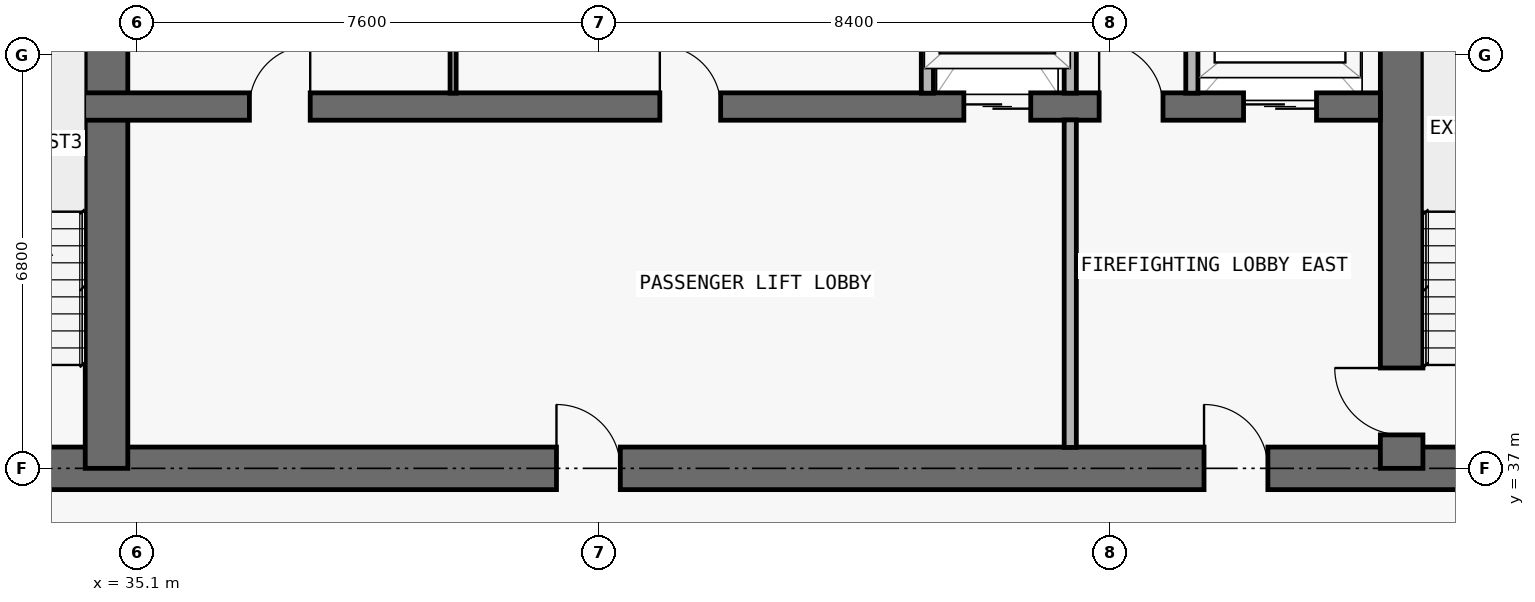
"""IFC4 building model, lengths in metres.
Left out: names, types, materials, properties, quantities, classifications, styles, units other than length and angle.
Written with IfcOpenShell. Run it as: python <this file> out.ifc"""

import sys

from ifc_helpers import new_model, si_unit, direction, frame, frame_2d, origin, place, context, subcontext, project, spatial, rectangle, extrude, element, fill, save


model = new_model("IFC4")
c1 = context("Model", 3, precision=1e-05, world=origin(), true_north=direction((0.0, 1.0)))
c2 = subcontext(c1, "Body", "Model", "MODEL_VIEW")
j1 = project(units=[si_unit("LENGTHUNIT", "METRE"), si_unit("PLANEANGLEUNIT", "RADIAN")], contexts=[c1])
p1 = place(None, origin())
s1 = spatial("IfcSite", under=j1, at=p1, CompositionType="ELEMENT")
p2 = place(p1, origin())
s2 = spatial("IfcBuilding", under=s1, at=p2, CompositionType="ELEMENT")
p3 = place(p2, frame((0.0, 0.0, 262.8)))
s3 = spatial("IfcBuildingStorey", under=s2, at=p3, CompositionType="ELEMENT", Elevation=262.8)
p4 = place(p3, frame((17.95, 37.0, 0.0), z_axis=(0.0, 0.0, 1.0), x_axis=(1.0, 0.0, 0.0)))
e1 = element("IfcWall", 1, at=p4, inside=s3, PredefinedType="SHEAR", context=c2, shape_type="SweptSolid", body=[
    extrude(rectangle(XDim=41.9, YDim=0.7, at=frame_2d((20.95, 0.0))), origin(), (0.0, 0.0, 1.0), 3.05),
])
p5 = place(p4, frame((14.35, 0.0, 0.0)))
e2 = element("IfcOpeningElement", 2, at=p5, cuts=e1, PredefinedType="OPENING", context=c2, shape_type="SweptSolid", body=[
    extrude(rectangle(XDim=1.1, YDim=2.15, at=frame_2d((0.55, 1.075))), frame((0.0, 0.36, 0.0), z_axis=(0.0, -1.0, 0.0), x_axis=(1.0, 0.0, 0.0)), (0.0, 0.0, 1.0), 0.72),
])
p6 = place(p4, frame((6.2, 0.0, 0.0)))
e3 = element("IfcOpeningElement", 3, at=p6, cuts=e1, PredefinedType="OPENING", context=c2, shape_type="SweptSolid", body=[
    extrude(rectangle(XDim=1.05, YDim=2.15, at=frame_2d((0.525, 1.075))), frame((0.0, 0.36, 0.0), z_axis=(0.0, -1.0, 0.0), x_axis=(1.0, 0.0, 0.0)), (0.0, 0.0, 1.0), 0.72),
])
p7 = place(p4, frame((34.7, 0.0, 0.0)))
e4 = element("IfcOpeningElement", 4, at=p7, cuts=e1, PredefinedType="OPENING", context=c2, shape_type="SweptSolid", body=[
    extrude(rectangle(XDim=1.05, YDim=2.15, at=frame_2d((0.525, 1.075))), frame((0.0, 0.36, 0.0), z_axis=(0.0, -1.0, 0.0), x_axis=(1.0, 0.0, 0.0)), (0.0, 0.0, 1.0), 0.72),
])
p8 = place(p4, frame((10.812, 0.0, 0.0)))
e5 = element("IfcOpeningElement", 5, at=p8, cuts=e1, PredefinedType="OPENING", context=c2, shape_type="SweptSolid", body=[
    extrude(rectangle(XDim=1.05, YDim=2.15, at=frame_2d((0.525, 1.075))), frame((0.0, 0.36, 0.0), z_axis=(0.0, -1.0, 0.0), x_axis=(1.0, 0.0, 0.0)), (0.0, 0.0, 1.0), 0.72),
])
p9 = place(p4, frame((24.05, 0.0, 0.0)))
e6 = element("IfcOpeningElement", 6, at=p9, cuts=e1, PredefinedType="OPENING", context=c2, shape_type="SweptSolid", body=[
    extrude(rectangle(XDim=1.05, YDim=2.15, at=frame_2d((0.525, 1.075))), frame((0.0, 0.36, 0.0), z_axis=(0.0, -1.0, 0.0), x_axis=(1.0, 0.0, 0.0)), (0.0, 0.0, 1.0), 0.72),
])
p10 = place(p3, frame((55.9, 37.0, 0.0), z_axis=(0.0, 0.0, 1.0), x_axis=(0.0, 1.0, 0.0)))
e7 = element("IfcWall", 7, at=p10, inside=s3, PredefinedType="SHEAR", context=c2, shape_type="SweptSolid", body=[
    extrude(rectangle(XDim=9.575, YDim=0.7, at=frame_2d((4.788, 0.0))), origin(), (0.0, 0.0, 1.0), 3.05),
])
p11 = place(p10, frame((0.55, 0.0, 0.0)))
e8 = element("IfcOpeningElement", 8, at=p11, cuts=e7, PredefinedType="OPENING", context=c2, shape_type="SweptSolid", body=[
    extrude(rectangle(XDim=1.1, YDim=2.15, at=frame_2d((0.55, 1.075))), frame((0.0, 0.36, 0.0), z_axis=(0.0, -1.0, 0.0), x_axis=(1.0, 0.0, 0.0)), (0.0, 0.0, 1.0), 0.72),
])
p12 = place(p3, frame((34.6, 37.0, 0.0), z_axis=(0.0, 0.0, 1.0), x_axis=(0.0, 1.0, 0.0)))
e9 = element("IfcWall", 9, at=p12, inside=s3, PredefinedType="SHEAR", context=c2, shape_type="SweptSolid", body=[
    extrude(rectangle(XDim=9.575, YDim=0.7, at=frame_2d((4.788, 0.0))), origin(), (0.0, 0.0, 1.0), 3.05),
])
p13 = place(p3, frame((22.25, 42.95, 0.0), z_axis=(0.0, 0.0, 1.0), x_axis=(1.0, 0.0, 0.0)))
e10 = element("IfcWall", 10, at=p13, inside=s3, PredefinedType="SHEAR", context=c2, shape_type="SweptSolid", body=[
    extrude(rectangle(XDim=33.3, YDim=0.45, at=frame_2d((16.65, 0.0))), origin(), (0.0, 0.0, 1.0), 3.05),
])
p14 = place(p13, frame((1.05, 0.0, 0.0)))
e11 = element("IfcOpeningElement", 11, at=p14, cuts=e10, PredefinedType="OPENING", context=c2, shape_type="SweptSolid", body=[
    extrude(rectangle(XDim=1.2, YDim=2.2, at=frame_2d((0.6, 1.1))), frame((0.0, 0.235, 0.0), z_axis=(0.0, -1.0, 0.0), x_axis=(1.0, 0.0, 0.0)), (0.0, 0.0, 1.0), 0.47),
])
p15 = place(p13, frame((31.05, 0.0, 0.0)))
e12 = element("IfcOpeningElement", 12, at=p15, cuts=e10, PredefinedType="OPENING", context=c2, shape_type="SweptSolid", body=[
    extrude(rectangle(XDim=1.2, YDim=2.2, at=frame_2d((0.6, 1.1))), frame((0.0, 0.235, 0.0), z_axis=(0.0, -1.0, 0.0), x_axis=(1.0, 0.0, 0.0)), (0.0, 0.0, 1.0), 0.47),
])
p16 = place(p13, frame((26.45, 0.0, 0.0)))
e13 = element("IfcOpeningElement", 13, at=p16, cuts=e10, PredefinedType="OPENING", context=c2, shape_type="SweptSolid", body=[
    extrude(rectangle(XDim=1.1, YDim=2.2, at=frame_2d((0.55, 1.1))), frame((0.0, 0.235, 0.0), z_axis=(0.0, -1.0, 0.0), x_axis=(1.0, 0.0, 0.0)), (0.0, 0.0, 1.0), 0.47),
])
p17 = place(p13, frame((5.95, 0.0, 0.0)))
e14 = element("IfcOpeningElement", 14, at=p17, cuts=e10, PredefinedType="OPENING", context=c2, shape_type="SweptSolid", body=[
    extrude(rectangle(XDim=1.1, YDim=2.2, at=frame_2d((0.55, 1.1))), frame((0.0, 0.235, 0.0), z_axis=(0.0, -1.0, 0.0), x_axis=(1.0, 0.0, 0.0)), (0.0, 0.0, 1.0), 0.47),
])
p18 = place(p13, frame((3.625, 0.0, 0.0)))
e15 = element("IfcOpeningElement", 15, at=p18, cuts=e10, PredefinedType="OPENING", context=c2, shape_type="SweptSolid", body=[
    extrude(rectangle(XDim=1.05, YDim=2.15, at=frame_2d((0.525, 1.075))), frame((0.0, 0.235, 0.0), z_axis=(0.0, -1.0, 0.0), x_axis=(1.0, 0.0, 0.0)), (0.0, 0.0, 1.0), 0.47),
])
p19 = place(p13, frame((28.675, 0.0, 0.0)))
e16 = element("IfcOpeningElement", 16, at=p19, cuts=e10, PredefinedType="OPENING", context=c2, shape_type="SweptSolid", body=[
    extrude(rectangle(XDim=1.05, YDim=2.15, at=frame_2d((0.525, 1.075))), frame((0.0, 0.235, 0.0), z_axis=(0.0, -1.0, 0.0), x_axis=(1.0, 0.0, 0.0)), (0.0, 0.0, 1.0), 0.47),
])
p20 = place(p13, frame((14.7, 0.0, 0.0)))
e17 = element("IfcOpeningElement", 17, at=p20, cuts=e10, PredefinedType="OPENING", context=c2, shape_type="SweptSolid", body=[
    extrude(rectangle(XDim=1.0, YDim=2.2, at=frame_2d((0.5, 1.1))), frame((0.0, 0.235, 0.0), z_axis=(0.0, -1.0, 0.0), x_axis=(1.0, 0.0, 0.0)), (0.0, 0.0, 1.0), 0.47),
])
p21 = place(p13, frame((21.45, 0.0, 0.0)))
e18 = element("IfcOpeningElement", 18, at=p21, cuts=e10, PredefinedType="OPENING", context=c2, shape_type="SweptSolid", body=[
    extrude(rectangle(XDim=1.0, YDim=2.2, at=frame_2d((0.5, 1.1))), frame((0.0, 0.235, 0.0), z_axis=(0.0, -1.0, 0.0), x_axis=(1.0, 0.0, 0.0)), (0.0, 0.0, 1.0), 0.47),
])
p22 = place(p3, frame((40.3, 43.17, 0.0), z_axis=(0.0, 0.0, 1.0), x_axis=(0.0, 1.0, 0.0)))
e19 = element("IfcWall", 19, at=p22, inside=s3, PredefinedType="MOVABLE", context=c2, shape_type="SweptSolid", body=[
    extrude(rectangle(XDim=3.185, YDim=0.1, at=frame_2d((1.593, 0.0))), origin(), (0.0, 0.0, 1.0), 3.05),
])
p23 = place(p3, frame((48.1, 43.17, 0.0), z_axis=(0.0, 0.0, 1.0), x_axis=(0.0, 1.0, 0.0)))
e20 = element("IfcWall", 20, at=p23, inside=s3, PredefinedType="PARTITIONING", context=c2, shape_type="SweptSolid", body=[
    extrude(rectangle(XDim=3.185, YDim=0.2, at=frame_2d((1.593, 0.0))), origin(), (0.0, 0.0, 1.0), 3.05),
])
p24 = place(p3, frame((50.45, 37.345, 0.0), z_axis=(0.0, 0.0, 1.0), x_axis=(0.0, 1.0, 0.0)))
e21 = element("IfcWall", 21, at=p24, inside=s3, PredefinedType="PARTITIONING", context=c2, shape_type="SweptSolid", body=[
    extrude(rectangle(XDim=5.385, YDim=0.2, at=frame_2d((2.692, 0.0))), origin(), (0.0, 0.0, 1.0), 3.05),
])
for number, where, z_axis, x_axis in (
    (22, (50.45, 43.17, 0.0), (0.0, 0.0, 1.0), (0.0, 1.0, 0.0)),
    (23, (52.45, 43.17, 0.0), (0.0, 0.0, 1.0), (0.0, 1.0, 0.0)),
):
    element("IfcWall", number, at=place(p3, frame(where, z_axis=z_axis, x_axis=x_axis)), inside=s3, PredefinedType="PARTITIONING", context=c2, shape_type="SweptSolid", body=[
        extrude(rectangle(XDim=3.185, YDim=0.2, at=frame_2d((1.593, 0.0))), origin(), (0.0, 0.0, 1.0), 3.05),
    ])
p25 = place(p15, origin())
e24 = element("IfcDoor", 24, at=p25, inside=s3, OperationType="DOUBLE_DOOR_SLIDING", PredefinedType="DOOR", context=c2, shape_type="SweptSolid", body=[
    extrude(rectangle(XDim=1.2, YDim=2.2, at=frame_2d((0.6, 1.1))), frame((0.0, 0.025, 0.0), z_axis=(0.0, -1.0, 0.0), x_axis=(1.0, 0.0, 0.0)), (0.0, 0.0, 1.0), 0.05),
])
fill(e12, e24)
p26 = place(p16, origin())
e25 = element("IfcDoor", 25, at=p26, inside=s3, OperationType="DOUBLE_DOOR_SLIDING", PredefinedType="DOOR", context=c2, shape_type="SweptSolid", body=[
    extrude(rectangle(XDim=1.1, YDim=2.2, at=frame_2d((0.55, 1.1))), frame((0.0, 0.025, 0.0), z_axis=(0.0, -1.0, 0.0), x_axis=(1.0, 0.0, 0.0)), (0.0, 0.0, 1.0), 0.05),
])
fill(e13, e25)
p27 = place(p7, origin())
e26 = element("IfcDoor", 26, at=p27, inside=s3, OperationType="SINGLE_SWING_LEFT", PredefinedType="DOOR", context=c2, shape_type="SweptSolid", body=[
    extrude(rectangle(XDim=1.05, YDim=2.15, at=frame_2d((0.525, 1.075))), frame((0.0, 0.025, 0.0), z_axis=(0.0, -1.0, 0.0), x_axis=(1.0, 0.0, 0.0)), (0.0, 0.0, 1.0), 0.05),
])
fill(e4, e26)
p28 = place(p11, origin())
e27 = element("IfcDoor", 27, at=p28, inside=s3, OperationType="SINGLE_SWING_RIGHT", PredefinedType="DOOR", context=c2, shape_type="SweptSolid", body=[
    extrude(rectangle(XDim=1.1, YDim=2.15, at=frame_2d((0.55, 1.075))), frame((0.0, 0.025, 0.0), z_axis=(0.0, -1.0, 0.0), x_axis=(1.0, 0.0, 0.0)), (0.0, 0.0, 1.0), 0.05),
])
fill(e8, e27)
p29 = place(p19, origin())
e28 = element("IfcDoor", 28, at=p29, inside=s3, OperationType="SINGLE_SWING_LEFT", PredefinedType="DOOR", context=c2, shape_type="SweptSolid", body=[
    extrude(rectangle(XDim=1.05, YDim=2.15, at=frame_2d((0.525, 1.075))), frame((0.0, 0.025, 0.0), z_axis=(0.0, -1.0, 0.0), x_axis=(1.0, 0.0, 0.0)), (0.0, 0.0, 1.0), 0.05),
])
fill(e16, e28)
p30 = place(p9, origin())
e29 = element("IfcDoor", 29, at=p30, inside=s3, OperationType="SINGLE_SWING_LEFT", PredefinedType="DOOR", context=c2, shape_type="SweptSolid", body=[
    extrude(rectangle(XDim=1.05, YDim=2.15, at=frame_2d((0.525, 1.075))), frame((0.0, 0.025, 0.0), z_axis=(0.0, -1.0, 0.0), x_axis=(1.0, 0.0, 0.0)), (0.0, 0.0, 1.0), 0.05),
])
fill(e6, e29)
p31 = place(p20, origin())
e30 = element("IfcDoor", 30, at=p31, inside=s3, OperationType="SINGLE_SWING_RIGHT", PredefinedType="DOOR", context=c2, shape_type="SweptSolid", body=[
    extrude(rectangle(XDim=1.0, YDim=2.2, at=frame_2d((0.5, 1.1))), frame((0.0, 0.025, 0.0), z_axis=(0.0, -1.0, 0.0), x_axis=(1.0, 0.0, 0.0)), (0.0, 0.0, 1.0), 0.05),
])
fill(e17, e30)
p32 = place(p21, origin())
e31 = element("IfcDoor", 31, at=p32, inside=s3, OperationType="SINGLE_SWING_LEFT", PredefinedType="DOOR", context=c2, shape_type="SweptSolid", body=[
    extrude(rectangle(XDim=1.0, YDim=2.2, at=frame_2d((0.5, 1.1))), frame((0.0, 0.025, 0.0), z_axis=(0.0, -1.0, 0.0), x_axis=(1.0, 0.0, 0.0)), (0.0, 0.0, 1.0), 0.05),
])
fill(e18, e31)
save(model, sys.argv[1])
